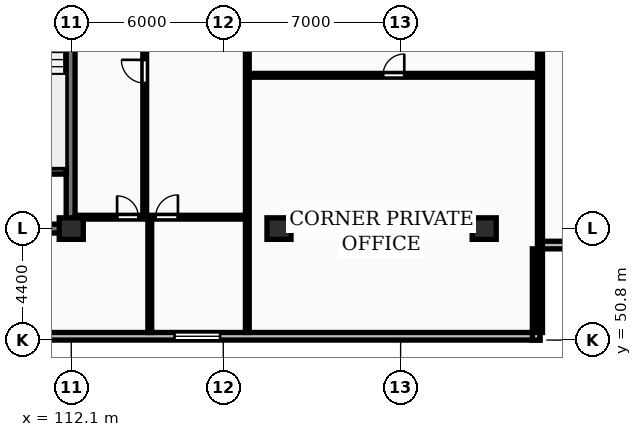
"""IFC4 building model, lengths in metres.
Left out: names, types, materials, properties, quantities, classifications, styles, units other than length and angle.
Written with IfcOpenShell. Run it as: python <this file> out.ifc"""

import sys

from ifc_helpers import new_model, si_unit, direction, frame, frame_2d, origin, origin_2d, place, context, subcontext, project, spatial, rectangle, extrude, element, fill, save


model = new_model("IFC4")
c1 = context("Model", 3, precision=1e-05, world=origin(), true_north=direction((0.0, 1.0)))
c2 = subcontext(c1, "Body", "Model", "MODEL_VIEW")
j1 = project(units=[si_unit("LENGTHUNIT", "METRE"), si_unit("PLANEANGLEUNIT", "RADIAN")], contexts=[c1])
p1 = place(None, origin())
s1 = spatial("IfcSite", under=j1, at=p1, CompositionType="ELEMENT")
p2 = place(p1, origin())
s2 = spatial("IfcBuilding", under=s1, at=p2, CompositionType="ELEMENT")
p3 = place(p2, frame((0.0, 0.0, 132.8)))
s3 = spatial("IfcBuildingStorey", under=s2, at=p3, CompositionType="ELEMENT", Elevation=132.8)
for number, where, z_axis, x_axis in (
    (1, (112.1, 55.2, 0.0), (0.0, 0.0, 1.0), (1.0, 0.0, 0.0)),
    (2, (120.3, 55.2, 0.0), (0.0, 0.0, 1.0), (1.0, 0.0, 0.0)),
    (3, (128.4, 55.2, 0.0), (0.0, 0.0, 1.0), (1.0, 0.0, 0.0)),
):
    element("IfcColumn", number, at=place(p3, frame(where, z_axis=z_axis, x_axis=x_axis)), inside=s3, PredefinedType="COLUMN", context=c2, shape_type="SweptSolid", body=[
        extrude(rectangle(XDim=0.95, YDim=0.85, at=origin_2d()), origin(), (0.0, 0.0, 1.0), 3.25),
    ])
p4 = place(p3, frame((57.6, 50.95, 0.0), z_axis=(0.0, 0.0, 1.0), x_axis=(1.0, 0.0, 0.0)))
e4 = element("IfcWall", 4, at=p4, inside=s3, PredefinedType="STANDARD", context=c2, shape_type="SweptSolid", body=[
    extrude(rectangle(XDim=73.0, YDim=0.3, at=frame_2d((36.5, 0.0))), origin(), (0.0, 0.0, 1.0), 2.97),
])
p5 = place(p4, frame((15.225, 0.0, 0.85)))
e5 = element("IfcOpeningElement", 5, at=p5, cuts=e4, PredefinedType="OPENING", context=c2, shape_type="SweptSolid", body=[
    extrude(rectangle(XDim=1.8, YDim=1.8, at=frame_2d((0.9, 0.9))), frame((0.0, 0.16, 0.0), z_axis=(0.0, -1.0, 0.0), x_axis=(1.0, 0.0, 0.0)), (0.0, 0.0, 1.0), 0.32),
])
p6 = place(p4, frame((58.575, 0.0, 0.85)))
e6 = element("IfcOpeningElement", 6, at=p6, cuts=e4, PredefinedType="OPENING", context=c2, shape_type="SweptSolid", body=[
    extrude(rectangle(XDim=1.8, YDim=1.8, at=frame_2d((0.9, 0.9))), frame((0.0, 0.16, 0.0), z_axis=(0.0, -1.0, 0.0), x_axis=(1.0, 0.0, 0.0)), (0.0, 0.0, 1.0), 0.32),
])
for number, where, z_axis, x_axis in (
    (7, (130.45, 50.8, 0.0), (0.0, 0.0, 1.0), (0.0, 1.0, 0.0)),
    (8, (130.6, 54.55, 0.0), (0.0, 0.0, 1.0), (1.0, 0.0, 0.0)),
):
    element("IfcWall", number, at=place(p3, frame(where, z_axis=z_axis, x_axis=x_axis)), inside=s3, PredefinedType="STANDARD", context=c2, shape_type="SweptSolid", body=[
        extrude(rectangle(XDim=3.6, YDim=0.3, at=frame_2d((1.8, 0.0))), origin(), (0.0, 0.0, 1.0), 2.97),
    ])
p7 = place(p3, frame((75.95, 55.2, 0.0), z_axis=(0.0, 0.0, 1.0), x_axis=(1.0, 0.0, 0.0)))
e9 = element("IfcWall", 9, at=p7, inside=s3, PredefinedType="SHEAR", context=c2, shape_type="SweptSolid", body=[
    extrude(rectangle(XDim=36.3, YDim=0.35, at=frame_2d((18.15, 0.0))), origin(), (0.0, 0.0, 1.0), 3.25),
])
p8 = place(p3, frame((112.075, 55.375, 0.0), z_axis=(0.0, 0.0, 1.0), x_axis=(0.0, 1.0, 0.0)))
e10 = element("IfcWall", 10, at=p8, inside=s3, PredefinedType="SHEAR", context=c2, shape_type="SweptSolid", body=[
    extrude(rectangle(XDim=11.65, YDim=0.35, at=frame_2d((5.825, 0.0))), origin(), (0.0, 0.0, 1.0), 3.25),
])
p9 = place(p3, frame((108.66, 57.475, 0.0), z_axis=(0.0, 0.0, 1.0), x_axis=(1.0, 0.0, 0.0)))
e11 = element("IfcWall", 11, at=p9, inside=s3, PredefinedType="SHEAR", context=c2, shape_type="SweptSolid", body=[
    extrude(rectangle(XDim=3.24, YDim=0.25, at=frame_2d((1.62, 0.0))), origin(), (0.0, 0.0, 1.0), 3.25),
])
p10 = place(p3, frame((130.6, 51.1, 0.0), z_axis=(0.0, 0.0, 1.0), x_axis=(0.0, 1.0, 0.0)))
e12 = element("IfcWall", 12, at=p10, inside=s3, PredefinedType="PARTITIONING", context=c2, shape_type="SweptSolid", body=[
    extrude(rectangle(XDim=16.1, YDim=0.2, at=frame_2d((8.05, 0.0))), origin(), (0.0, 0.0, 1.0), 2.97),
])
p11 = place(p3, frame((119.05, 61.25, 0.0), z_axis=(0.0, 0.0, 1.0), x_axis=(1.0, 0.0, 0.0)))
e13 = element("IfcWall", 13, at=p11, inside=s3, PredefinedType="PARTITIONING", context=c2, shape_type="SweptSolid", body=[
    extrude(rectangle(XDim=11.55, YDim=0.15, at=frame_2d((5.775, 0.0))), origin(), (0.0, 0.0, 1.0), 2.97),
])
p12 = place(p11, frame((5.355, 0.0, 0.0)))
e14 = element("IfcOpeningElement", 14, at=p12, cuts=e13, PredefinedType="OPENING", context=c2, shape_type="SweptSolid", body=[
    extrude(rectangle(XDim=0.84, YDim=2.04, at=frame_2d((0.42, 1.02))), frame((0.0, 0.085, 0.0), z_axis=(0.0, -1.0, 0.0), x_axis=(1.0, 0.0, 0.0)), (0.0, 0.0, 1.0), 0.17),
])
p13 = place(p3, frame((119.05, 51.1, 0.0), z_axis=(0.0, 0.0, 1.0), x_axis=(0.0, 1.0, 0.0)))
e15 = element("IfcWall", 15, at=p13, inside=s3, PredefinedType="PARTITIONING", context=c2, shape_type="SweptSolid", body=[
    extrude(rectangle(XDim=16.05, YDim=0.15, at=frame_2d((8.025, 0.0))), origin(), (0.0, 0.0, 1.0), 2.97),
])
p14 = place(p13, frame((11.3, 0.0, 0.0)))
e16 = element("IfcOpeningElement", 16, at=p14, cuts=e15, PredefinedType="OPENING", context=c2, shape_type="SweptSolid", body=[
    extrude(rectangle(XDim=0.88, YDim=2.06, at=frame_2d((0.44, 1.03))), frame((0.0, 0.085, 0.0), z_axis=(0.0, -1.0, 0.0), x_axis=(1.0, 0.0, 0.0)), (0.0, 0.0, 1.0), 0.17),
])
p15 = place(p3, frame((115.0, 55.65, 0.0), z_axis=(0.0, 0.0, 1.0), x_axis=(0.0, 1.0, 0.0)))
e17 = element("IfcWall", 17, at=p15, inside=s3, PredefinedType="PARTITIONING", context=c2, shape_type="SweptSolid", body=[
    extrude(rectangle(XDim=11.5, YDim=0.15, at=frame_2d((5.75, 0.0))), origin(), (0.0, 0.0, 1.0), 2.97),
])
p16 = place(p15, frame((5.29, 0.0, 0.0)))
e18 = element("IfcOpeningElement", 18, at=p16, cuts=e17, PredefinedType="OPENING", context=c2, shape_type="SweptSolid", body=[
    extrude(rectangle(XDim=0.92, YDim=2.08, at=frame_2d((0.46, 1.04))), frame((0.0, 0.085, 0.0), z_axis=(0.0, -1.0, 0.0), x_axis=(1.0, 0.0, 0.0)), (0.0, 0.0, 1.0), 0.17),
])
p17 = place(p3, frame((115.2, 51.1, 0.0), z_axis=(0.0, 0.0, 1.0), x_axis=(0.0, 1.0, 0.0)))
e19 = element("IfcWall", 19, at=p17, inside=s3, PredefinedType="PARTITIONING", context=c2, shape_type="SweptSolid", body=[
    extrude(rectangle(XDim=4.55, YDim=0.15, at=frame_2d((2.275, 0.0))), origin(), (0.0, 0.0, 1.0), 2.97),
])
p18 = place(p3, frame((112.27, 55.65, 0.0), z_axis=(0.0, 0.0, 1.0), x_axis=(1.0, 0.0, 0.0)))
e20 = element("IfcWall", 20, at=p18, inside=s3, PredefinedType="PARTITIONING", context=c2, shape_type="SweptSolid", body=[
    extrude(rectangle(XDim=6.76, YDim=0.15, at=frame_2d((3.38, 0.0))), origin(), (0.0, 0.0, 1.0), 2.97),
])
p19 = place(p18, frame((1.64, 0.0, 0.0)))
e21 = element("IfcOpeningElement", 21, at=p19, cuts=e20, PredefinedType="OPENING", context=c2, shape_type="SweptSolid", body=[
    extrude(rectangle(XDim=0.84, YDim=2.04, at=frame_2d((0.42, 1.02))), frame((0.0, 0.085, 0.0), z_axis=(0.0, -1.0, 0.0), x_axis=(1.0, 0.0, 0.0)), (0.0, 0.0, 1.0), 0.17),
])
p20 = place(p18, frame((3.16, 0.0, 0.0)))
e22 = element("IfcOpeningElement", 22, at=p20, cuts=e20, PredefinedType="OPENING", context=c2, shape_type="SweptSolid", body=[
    extrude(rectangle(XDim=0.88, YDim=2.06, at=frame_2d((0.44, 1.03))), frame((0.0, 0.085, 0.0), z_axis=(0.0, -1.0, 0.0), x_axis=(1.0, 0.0, 0.0)), (0.0, 0.0, 1.0), 0.17),
])
p21 = place(p6, origin())
e23 = element("IfcWindow", 23, at=p21, inside=s3, PartitioningType="SINGLE_PANEL", PredefinedType="WINDOW", context=c2, shape_type="SweptSolid", body=[
    extrude(rectangle(XDim=1.8, YDim=1.8, at=frame_2d((0.9, 0.9))), frame((0.0, 0.03, 0.0), z_axis=(0.0, -1.0, 0.0), x_axis=(1.0, 0.0, 0.0)), (0.0, 0.0, 1.0), 0.06),
])
fill(e6, e23)
p22 = place(p12, origin())
e24 = element("IfcDoor", 24, at=p22, inside=s3, OperationType="SINGLE_SWING_RIGHT", PredefinedType="DOOR", context=c2, shape_type="SweptSolid", body=[
    extrude(rectangle(XDim=0.84, YDim=2.04, at=frame_2d((0.42, 1.02))), frame((0.0, 0.025, 0.0), z_axis=(0.0, -1.0, 0.0), x_axis=(1.0, 0.0, 0.0)), (0.0, 0.0, 1.0), 0.05),
])
fill(e14, e24)
p23 = place(p16, origin())
e25 = element("IfcDoor", 25, at=p23, inside=s3, OperationType="SINGLE_SWING_RIGHT", PredefinedType="DOOR", context=c2, shape_type="SweptSolid", body=[
    extrude(rectangle(XDim=0.92, YDim=2.08, at=frame_2d((0.46, 1.04))), frame((0.0, 0.025, 0.0), z_axis=(0.0, -1.0, 0.0), x_axis=(1.0, 0.0, 0.0)), (0.0, 0.0, 1.0), 0.05),
])
fill(e18, e25)
p24 = place(p19, origin())
e26 = element("IfcDoor", 26, at=p24, inside=s3, OperationType="SINGLE_SWING_LEFT", PredefinedType="DOOR", context=c2, shape_type="SweptSolid", body=[
    extrude(rectangle(XDim=0.84, YDim=2.04, at=frame_2d((0.42, 1.02))), frame((0.0, 0.025, 0.0), z_axis=(0.0, -1.0, 0.0), x_axis=(1.0, 0.0, 0.0)), (0.0, 0.0, 1.0), 0.05),
])
fill(e21, e26)
p25 = place(p20, origin())
e27 = element("IfcDoor", 27, at=p25, inside=s3, OperationType="SINGLE_SWING_RIGHT", PredefinedType="DOOR", context=c2, shape_type="SweptSolid", body=[
    extrude(rectangle(XDim=0.88, YDim=2.06, at=frame_2d((0.44, 1.03))), frame((0.0, 0.025, 0.0), z_axis=(0.0, -1.0, 0.0), x_axis=(1.0, 0.0, 0.0)), (0.0, 0.0, 1.0), 0.05),
])
fill(e22, e27)
save(model, sys.argv[1])
